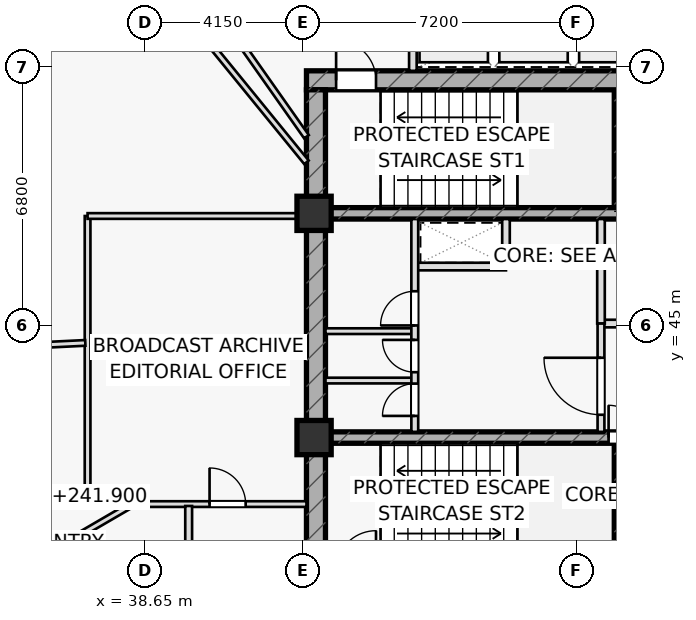
"""IFC4 building model, lengths in metres.
Left out: names, types, materials, properties, quantities, classifications, styles, units other than length and angle.
Written with IfcOpenShell. Run it as: python <this file> out.ifc"""

import sys

from ifc_helpers import new_model, si_unit, direction, frame, frame_2d, origin, origin_2d, place, context, subcontext, project, spatial, rectangle, extrude, element, fill, save


model = new_model("IFC4")
c1 = context("Model", 3, precision=1e-05, world=origin(), true_north=direction((0.0, 1.0)))
c2 = subcontext(c1, "Body", "Model", "MODEL_VIEW")
j1 = project(units=[si_unit("LENGTHUNIT", "METRE"), si_unit("PLANEANGLEUNIT", "RADIAN")], contexts=[c1])
p1 = place(None, origin())
s1 = spatial("IfcSite", under=j1, at=p1, CompositionType="ELEMENT")
p2 = place(p1, origin())
s2 = spatial("IfcBuilding", under=s1, at=p2, CompositionType="ELEMENT")
p3 = place(p2, frame((0.0, 0.0, 241.9)))
s3 = spatial("IfcBuildingStorey", under=s2, at=p3, CompositionType="ELEMENT", Elevation=241.9)
for number, where, z_axis, x_axis in (
    (1, (51.11, 48.1, 0.0), (0.0, 0.0, 1.0), (0.0, 1.0, 0.0)),
    (2, (51.11, 38.8, 0.0), (0.0, 0.0, 1.0), (0.0, 1.0, 0.0)),
):
    element("IfcWall", number, at=place(p3, frame(where, z_axis=z_axis, x_axis=x_axis)), inside=s3, PredefinedType="SHEAR", context=c2, shape_type="SweptSolid", body=[
        extrude(rectangle(XDim=3.1, YDim=0.22, at=frame_2d((1.55, 0.0))), origin(), (0.0, 0.0, 1.0), 3.65),
    ])
p4 = place(p3, frame((42.9, 51.45, 0.0), z_axis=(0.0, 0.0, 1.0), x_axis=(1.0, 0.0, 0.0)))
e3 = element("IfcWall", 3, at=p4, inside=s3, PredefinedType="SHEAR", context=c2, shape_type="SweptSolid", body=[
    extrude(rectangle(XDim=14.2, YDim=0.5, at=frame_2d((7.1, 0.0))), origin(), (0.0, 0.0, 1.0), 3.65),
])
p5 = place(p4, frame((0.78, 0.0, 0.0)))
e4 = element("IfcOpeningElement", 4, at=p5, cuts=e3, PredefinedType="OPENING", context=c2, shape_type="SweptSolid", body=[
    extrude(rectangle(XDim=1.05, YDim=2.2, at=frame_2d((0.525, 1.1))), frame((0.0, 0.26, 0.0), z_axis=(0.0, -1.0, 0.0), x_axis=(1.0, 0.0, 0.0)), (0.0, 0.0, 1.0), 0.52),
])
p6 = place(p3, frame((43.15, 38.8, 0.0), z_axis=(0.0, 0.0, 1.0), x_axis=(0.0, 1.0, 0.0)))
e5 = element("IfcWall", 5, at=p6, inside=s3, PredefinedType="SHEAR", context=c2, shape_type="SweptSolid", body=[
    extrude(rectangle(XDim=12.4, YDim=0.5, at=frame_2d((6.2, 0.0))), origin(), (0.0, 0.0, 1.0), 3.65),
])
p7 = place(p3, frame((43.4, 47.95, 0.0), z_axis=(0.0, 0.0, 1.0), x_axis=(1.0, 0.0, 0.0)))
e6 = element("IfcWall", 6, at=p7, inside=s3, PredefinedType="SHEAR", context=c2, shape_type="SweptSolid", body=[
    extrude(rectangle(XDim=13.2, YDim=0.3, at=frame_2d((6.6, 0.0))), origin(), (0.0, 0.0, 1.0), 3.65),
])
p8 = place(p7, frame((8.345, 0.0, 0.0)))
e7 = element("IfcOpeningElement", 7, at=p8, cuts=e6, PredefinedType="OPENING", context=c2, shape_type="SweptSolid", body=[
    extrude(rectangle(XDim=1.15, YDim=2.2, at=frame_2d((0.575, 1.1))), frame((0.0, 0.16, 0.0), z_axis=(0.0, -1.0, 0.0), x_axis=(1.0, 0.0, 0.0)), (0.0, 0.0, 1.0), 0.32),
])
p9 = place(p7, frame((10.065, 0.0, 0.0)))
e8 = element("IfcOpeningElement", 8, at=p9, cuts=e6, PredefinedType="OPENING", context=c2, shape_type="SweptSolid", body=[
    extrude(rectangle(XDim=1.15, YDim=2.2, at=frame_2d((0.575, 1.1))), frame((0.0, 0.16, 0.0), z_axis=(0.0, -1.0, 0.0), x_axis=(1.0, 0.0, 0.0)), (0.0, 0.0, 1.0), 0.32),
])
p10 = place(p7, frame((11.645, 0.0, 0.0)))
e9 = element("IfcOpeningElement", 9, at=p10, cuts=e6, PredefinedType="OPENING", context=c2, shape_type="SweptSolid", body=[
    extrude(rectangle(XDim=1.15, YDim=2.2, at=frame_2d((0.575, 1.1))), frame((0.0, 0.16, 0.0), z_axis=(0.0, -1.0, 0.0), x_axis=(1.0, 0.0, 0.0)), (0.0, 0.0, 1.0), 0.32),
])
p11 = place(p3, frame((43.4, 42.05, 0.0), z_axis=(0.0, 0.0, 1.0), x_axis=(1.0, 0.0, 0.0)))
e10 = element("IfcWall", 10, at=p11, inside=s3, PredefinedType="SHEAR", context=c2, shape_type="SweptSolid", body=[
    extrude(rectangle(XDim=13.2, YDim=0.3, at=frame_2d((6.6, 0.0))), origin(), (0.0, 0.0, 1.0), 3.65),
])
p12 = place(p11, frame((7.45, 0.0, 0.0)))
e11 = element("IfcOpeningElement", 11, at=p12, cuts=e10, PredefinedType="OPENING", context=c2, shape_type="SweptSolid", body=[
    extrude(rectangle(XDim=0.85, YDim=2.05, at=frame_2d((0.425, 1.025))), frame((0.0, 0.16, 0.0), z_axis=(0.0, -1.0, 0.0), x_axis=(1.0, 0.0, 0.0)), (0.0, 0.0, 1.0), 0.32),
])
p13 = place(p11, frame((9.5, 0.0, 0.0)))
e12 = element("IfcOpeningElement", 12, at=p13, cuts=e10, PredefinedType="OPENING", context=c2, shape_type="SweptSolid", body=[
    extrude(rectangle(XDim=0.85, YDim=2.05, at=frame_2d((0.425, 1.025))), frame((0.0, 0.16, 0.0), z_axis=(0.0, -1.0, 0.0), x_axis=(1.0, 0.0, 0.0)), (0.0, 0.0, 1.0), 0.32),
])
p14 = place(p11, frame((11.6, 0.0, 0.0)))
e13 = element("IfcOpeningElement", 13, at=p14, cuts=e10, PredefinedType="OPENING", context=c2, shape_type="SweptSolid", body=[
    extrude(rectangle(XDim=0.85, YDim=2.05, at=frame_2d((0.425, 1.025))), frame((0.0, 0.16, 0.0), z_axis=(0.0, -1.0, 0.0), x_axis=(1.0, 0.0, 0.0)), (0.0, 0.0, 1.0), 0.32),
])
for number, where, z_axis, x_axis in (
    (14, (43.1, 47.95, 0.0), (0.0, 0.0, 1.0), (1.0, 0.0, 0.0)),
    (15, (43.1, 42.05, 0.0), (0.0, 0.0, 1.0), (1.0, 0.0, 0.0)),
):
    element("IfcColumn", number, at=place(p3, frame(where, z_axis=z_axis, x_axis=x_axis)), inside=s3, PredefinedType="COLUMN", context=c2, shape_type="SweptSolid", body=[
        extrude(rectangle(XDim=0.9, YDim=0.9, at=origin_2d()), origin(), (0.0, 0.0, 1.0), 3.65),
    ])
p15 = place(p3, frame((45.7, 51.7, 0.0), z_axis=(0.0, 0.0, 1.0), x_axis=(0.0, 1.0, 0.0)))
e16 = element("IfcWall", 16, at=p15, inside=s3, PredefinedType="PARTITIONING", context=c2, shape_type="SweptSolid", body=[
    extrude(rectangle(XDim=2.6, YDim=0.2, at=frame_2d((1.3, 0.0))), origin(), (0.0, 0.0, 1.0), 3.65),
])
p16 = place(p3, frame((45.75, 46.55, 0.0), z_axis=(0.0, 0.0, 1.0), x_axis=(1.0, 0.0, 0.0)))
e17 = element("IfcWall", 17, at=p16, inside=s3, PredefinedType="PARTITIONING", context=c2, shape_type="SweptSolid", body=[
    extrude(rectangle(XDim=2.4, YDim=0.2, at=frame_2d((1.2, 0.0))), origin(), (0.0, 0.0, 1.0), 3.65),
])
p17 = place(p3, frame((48.15, 46.55, 0.0), z_axis=(0.0, 0.0, 1.0), x_axis=(0.0, 1.0, 0.0)))
e18 = element("IfcWall", 18, at=p17, inside=s3, PredefinedType="PARTITIONING", context=c2, shape_type="SweptSolid", body=[
    extrude(rectangle(XDim=1.25, YDim=0.2, at=frame_2d((0.625, 0.0))), origin(), (0.0, 0.0, 1.0), 3.65),
])
p18 = place(p3, frame((50.65, 45.05, 0.0), z_axis=(0.0, 0.0, 1.0), x_axis=(1.0, 0.0, 0.0)))
e19 = element("IfcWall", 19, at=p18, inside=s3, PredefinedType="PARTITIONING", context=c2, shape_type="SweptSolid", body=[
    extrude(rectangle(XDim=5.95, YDim=0.2, at=frame_2d((2.975, 0.0))), origin(), (0.0, 0.0, 1.0), 3.65),
])
p19 = place(p18, frame((1.35, 0.0, 0.0)))
e20 = element("IfcOpeningElement", 20, at=p19, cuts=e19, PredefinedType="OPENING", context=c2, shape_type="SweptSolid", body=[
    extrude(rectangle(XDim=1.5, YDim=2.2, at=frame_2d((0.75, 1.1))), frame((0.0, 0.11, 0.0), z_axis=(0.0, -1.0, 0.0), x_axis=(1.0, 0.0, 0.0)), (0.0, 0.0, 1.0), 0.22),
])
p20 = place(p3, frame((50.65, 45.05, 0.0), z_axis=(0.0, 0.0, 1.0), x_axis=(0.0, 1.0, 0.0)))
e21 = element("IfcWall", 21, at=p20, inside=s3, PredefinedType="PARTITIONING", context=c2, shape_type="SweptSolid", body=[
    extrude(rectangle(XDim=2.75, YDim=0.2, at=frame_2d((1.375, 0.0))), origin(), (0.0, 0.0, 1.0), 3.65),
])
p21 = place(p3, frame((50.65, 42.2, 0.0), z_axis=(0.0, 0.0, 1.0), x_axis=(0.0, 1.0, 0.0)))
e22 = element("IfcWall", 22, at=p21, inside=s3, PredefinedType="PARTITIONING", context=c2, shape_type="SweptSolid", body=[
    extrude(rectangle(XDim=2.85, YDim=0.18, at=frame_2d((1.425, 0.0))), origin(), (0.0, 0.0, 1.0), 3.65),
])
p22 = place(p21, frame((0.45, 0.0, 0.0)))
e23 = element("IfcOpeningElement", 23, at=p22, cuts=e22, PredefinedType="OPENING", context=c2, shape_type="SweptSolid", body=[
    extrude(rectangle(XDim=1.5, YDim=2.2, at=frame_2d((0.75, 1.1))), frame((0.0, 0.1, 0.0), z_axis=(0.0, -1.0, 0.0), x_axis=(1.0, 0.0, 0.0)), (0.0, 0.0, 1.0), 0.2),
])
for number, where, z_axis, x_axis in (
    (24, (43.4, 43.55, 0.0), (0.0, 0.0, 1.0), (1.0, 0.0, 0.0)),
    (25, (43.4, 44.85, 0.0), (0.0, 0.0, 1.0), (1.0, 0.0, 0.0)),
):
    element("IfcWall", number, at=place(p3, frame(where, z_axis=z_axis, x_axis=x_axis)), inside=s3, PredefinedType="PARTITIONING", context=c2, shape_type="SweptSolid", body=[
        extrude(rectangle(XDim=2.35, YDim=0.15, at=frame_2d((1.175, 0.0))), origin(), (0.0, 0.0, 1.0), 3.65),
    ])
p23 = place(p3, frame((45.75, 42.2, 0.0), z_axis=(0.0, 0.0, 1.0), x_axis=(0.0, 1.0, 0.0)))
e26 = element("IfcWall", 26, at=p23, inside=s3, PredefinedType="PARTITIONING", context=c2, shape_type="SweptSolid", body=[
    extrude(rectangle(XDim=5.6, YDim=0.18, at=frame_2d((2.8, 0.0))), origin(), (0.0, 0.0, 1.0), 3.65),
])
p24 = place(p23, frame((0.42, 0.0, 0.0)))
e27 = element("IfcOpeningElement", 27, at=p24, cuts=e26, PredefinedType="OPENING", context=c2, shape_type="SweptSolid", body=[
    extrude(rectangle(XDim=0.85, YDim=2.05, at=frame_2d((0.425, 1.025))), frame((0.0, 0.1, 0.0), z_axis=(0.0, -1.0, 0.0), x_axis=(1.0, 0.0, 0.0)), (0.0, 0.0, 1.0), 0.2),
])
p25 = place(p23, frame((1.57, 0.0, 0.0)))
e28 = element("IfcOpeningElement", 28, at=p25, cuts=e26, PredefinedType="OPENING", context=c2, shape_type="SweptSolid", body=[
    extrude(rectangle(XDim=0.85, YDim=2.05, at=frame_2d((0.425, 1.025))), frame((0.0, 0.1, 0.0), z_axis=(0.0, -1.0, 0.0), x_axis=(1.0, 0.0, 0.0)), (0.0, 0.0, 1.0), 0.2),
])
p26 = place(p23, frame((2.8, 0.0, 0.0)))
e29 = element("IfcOpeningElement", 29, at=p26, cuts=e26, PredefinedType="OPENING", context=c2, shape_type="SweptSolid", body=[
    extrude(rectangle(XDim=0.9, YDim=2.05, at=frame_2d((0.45, 1.025))), frame((0.0, 0.1, 0.0), z_axis=(0.0, -1.0, 0.0), x_axis=(1.0, 0.0, 0.0)), (0.0, 0.0, 1.0), 0.2),
])
p27 = place(p3, frame((37.14, 40.3, 0.0), z_axis=(0.0, 0.0, 1.0), x_axis=(1.0, 0.0, 0.0)))
e30 = element("IfcWall", 30, at=p27, inside=s3, PredefinedType="PARTITIONING", context=c2, shape_type="SweptSolid", body=[
    extrude(rectangle(XDim=5.76, YDim=0.15, at=frame_2d((2.88, 0.0))), origin(), (0.0, 0.0, 1.0), 3.025),
])
p28 = place(p27, frame((3.21, 0.0, 0.0)))
e31 = element("IfcOpeningElement", 31, at=p28, cuts=e30, PredefinedType="OPENING", context=c2, shape_type="SweptSolid", body=[
    extrude(rectangle(XDim=0.95, YDim=2.05, at=frame_2d((0.475, 1.025))), frame((0.0, 0.085, 0.0), z_axis=(0.0, -1.0, 0.0), x_axis=(1.0, 0.0, 0.0)), (0.0, 0.0, 1.0), 0.17),
])
p29 = place(p3, frame((37.14, 40.3, 0.0), z_axis=(0.0, 0.0, 1.0), x_axis=(0.0, 1.0, 0.0)))
e32 = element("IfcWall", 32, at=p29, inside=s3, PredefinedType="PARTITIONING", context=c2, shape_type="SweptSolid", body=[
    extrude(rectangle(XDim=7.58, YDim=0.15, at=frame_2d((3.79, 0.0))), origin(), (0.0, 0.0, 1.0), 3.65),
])
p30 = place(p3, frame((37.14, 47.88, 0.0), z_axis=(0.0, 0.0, 1.0), x_axis=(1.0, 0.0, 0.0)))
e33 = element("IfcWall", 33, at=p30, inside=s3, PredefinedType="PARTITIONING", context=c2, shape_type="SweptSolid", body=[
    extrude(rectangle(XDim=5.76, YDim=0.15, at=frame_2d((2.88, 0.0))), origin(), (0.0, 0.0, 1.0), 3.025),
])
p31 = place(p3, frame((42.9, 49.966, 0.0), z_axis=(0.0, 0.0, 1.0), x_axis=(-0.576088019717, 0.817387664171, 0.0)))
e34 = element("IfcWall", 34, at=p31, inside=s3, PredefinedType="PARTITIONING", context=c2, shape_type="SweptSolid", body=[
    extrude(rectangle(XDim=18.251, YDim=0.15, at=frame_2d((9.126, 0.0))), origin(), (0.0, 0.0, 1.0), 3.025),
])
p32 = place(p31, frame((8.213, 0.0, 0.0)))
e35 = element("IfcOpeningElement", 35, at=p32, cuts=e34, PredefinedType="OPENING", context=c2, shape_type="SweptSolid", body=[
    extrude(rectangle(XDim=0.95, YDim=2.05, at=frame_2d((0.475, 1.025))), frame((0.0, 0.085, 0.0), z_axis=(0.0, -1.0, 0.0), x_axis=(1.0, 0.0, 0.0)), (0.0, 0.0, 1.0), 0.17),
])
p33 = place(p3, frame((42.9, 49.292, 0.0), z_axis=(0.0, 0.0, 1.0), x_axis=(-0.63196588554, 0.774996206128, 0.0)))
e36 = element("IfcWall", 36, at=p33, inside=s3, PredefinedType="PARTITIONING", context=c2, shape_type="SweptSolid", body=[
    extrude(rectangle(XDim=19.884, YDim=0.15, at=frame_2d((9.942, 0.0))), origin(), (0.0, 0.0, 1.0), 3.025),
])
p34 = place(p33, frame((8.948, 0.0, 0.0)))
e37 = element("IfcOpeningElement", 37, at=p34, cuts=e36, PredefinedType="OPENING", context=c2, shape_type="SweptSolid", body=[
    extrude(rectangle(XDim=0.95, YDim=2.05, at=frame_2d((0.475, 1.025))), frame((0.0, 0.085, 0.0), z_axis=(0.0, -1.0, 0.0), x_axis=(1.0, 0.0, 0.0)), (0.0, 0.0, 1.0), 0.17),
])
p35 = place(p3, frame((37.08, 44.541, 0.0), z_axis=(0.0, 0.0, 1.0), x_axis=(-0.998789744321, -0.049183804653, 0.0)))
e38 = element("IfcWall", 38, at=p35, inside=s3, PredefinedType="PARTITIONING", context=c2, shape_type="SweptSolid", body=[
    extrude(rectangle(XDim=10.419, YDim=0.15, at=frame_2d((5.209, 0.0))), origin(), (0.0, 0.0, 1.0), 3.135),
])
p36 = place(p35, frame((3.15, 0.0, 0.0)))
e39 = element("IfcOpeningElement", 39, at=p36, cuts=e38, PredefinedType="OPENING", context=c2, shape_type="SweptSolid", body=[
    extrude(rectangle(XDim=0.95, YDim=2.05, at=frame_2d((0.475, 1.025))), frame((0.0, 0.085, 0.0), z_axis=(0.0, -1.0, 0.0), x_axis=(1.0, 0.0, 0.0)), (0.0, 0.0, 1.0), 0.17),
])
p37 = place(p3, frame((38.227, 40.24, 0.0), z_axis=(0.0, 0.0, 1.0), x_axis=(-0.864129548562, -0.503269434103, 0.0)))
e40 = element("IfcWall", 40, at=p37, inside=s3, PredefinedType="PARTITIONING", context=c2, shape_type="SweptSolid", body=[
    extrude(rectangle(XDim=10.146, YDim=0.15, at=frame_2d((5.073, 0.0))), origin(), (0.0, 0.0, 1.0), 3.135),
])
p38 = place(p3, frame((39.8, 36.17, 0.0), z_axis=(0.0, 0.0, 1.0), x_axis=(0.0, 1.0, 0.0)))
e41 = element("IfcWall", 41, at=p38, inside=s3, PredefinedType="PARTITIONING", context=c2, shape_type="SweptSolid", body=[
    extrude(rectangle(XDim=4.08, YDim=0.18, at=frame_2d((2.04, 0.0))), origin(), (0.0, 0.0, 1.0), 3.325),
])
p39 = place(p38, frame((1.868, 0.0, 0.0)))
e42 = element("IfcOpeningElement", 42, at=p39, cuts=e41, PredefinedType="OPENING", context=c2, shape_type="SweptSolid", body=[
    extrude(rectangle(XDim=0.95, YDim=2.05, at=frame_2d((0.475, 1.025))), frame((0.0, 0.1, 0.0), z_axis=(0.0, -1.0, 0.0), x_axis=(1.0, 0.0, 0.0)), (0.0, 0.0, 1.0), 0.2),
])
p40 = place(p5, origin())
e43 = element("IfcDoor", 43, at=p40, inside=s3, OperationType="SINGLE_SWING_LEFT", PredefinedType="DOOR", context=c2, shape_type="SweptSolid", body=[
    extrude(rectangle(XDim=1.05, YDim=2.2, at=frame_2d((0.525, 1.1))), frame((0.0, 0.025, 0.0), z_axis=(0.0, -1.0, 0.0), x_axis=(1.0, 0.0, 0.0)), (0.0, 0.0, 1.0), 0.05),
])
fill(e4, e43)
p41 = place(p22, origin())
e44 = element("IfcDoor", 44, at=p41, inside=s3, OperationType="SINGLE_SWING_RIGHT", PredefinedType="DOOR", context=c2, shape_type="SweptSolid", body=[
    extrude(rectangle(XDim=1.5, YDim=2.2, at=frame_2d((0.75, 1.1))), frame((0.0, 0.025, 0.0), z_axis=(0.0, -1.0, 0.0), x_axis=(1.0, 0.0, 0.0)), (0.0, 0.0, 1.0), 0.05),
])
fill(e23, e44)
p42 = place(p12, origin())
e45 = element("IfcDoor", 45, at=p42, inside=s3, OperationType="SINGLE_SWING_LEFT", PredefinedType="DOOR", context=c2, shape_type="SweptSolid", body=[
    extrude(rectangle(XDim=0.85, YDim=2.05, at=frame_2d((0.425, 1.025))), frame((0.0, 0.025, 0.0), z_axis=(0.0, -1.0, 0.0), x_axis=(1.0, 0.0, 0.0)), (0.0, 0.0, 1.0), 0.05),
])
fill(e11, e45)
p43 = place(p24, origin())
e46 = element("IfcDoor", 46, at=p43, inside=s3, OperationType="SINGLE_SWING_LEFT", PredefinedType="DOOR", context=c2, shape_type="SweptSolid", body=[
    extrude(rectangle(XDim=0.85, YDim=2.05, at=frame_2d((0.425, 1.025))), frame((0.0, 0.025, 0.0), z_axis=(0.0, -1.0, 0.0), x_axis=(1.0, 0.0, 0.0)), (0.0, 0.0, 1.0), 0.05),
])
fill(e27, e46)
p44 = place(p25, origin())
e47 = element("IfcDoor", 47, at=p44, inside=s3, OperationType="SINGLE_SWING_RIGHT", PredefinedType="DOOR", context=c2, shape_type="SweptSolid", body=[
    extrude(rectangle(XDim=0.85, YDim=2.05, at=frame_2d((0.425, 1.025))), frame((0.0, 0.025, 0.0), z_axis=(0.0, -1.0, 0.0), x_axis=(1.0, 0.0, 0.0)), (0.0, 0.0, 1.0), 0.05),
])
fill(e28, e47)
p45 = place(p26, origin())
e48 = element("IfcDoor", 48, at=p45, inside=s3, OperationType="SINGLE_SWING_LEFT", PredefinedType="DOOR", context=c2, shape_type="SweptSolid", body=[
    extrude(rectangle(XDim=0.9, YDim=2.05, at=frame_2d((0.45, 1.025))), frame((0.0, 0.025, 0.0), z_axis=(0.0, -1.0, 0.0), x_axis=(1.0, 0.0, 0.0)), (0.0, 0.0, 1.0), 0.05),
])
fill(e29, e48)
p46 = place(p28, origin())
e49 = element("IfcDoor", 49, at=p46, inside=s3, OperationType="SINGLE_SWING_LEFT", PredefinedType="DOOR", context=c2, shape_type="SweptSolid", body=[
    extrude(rectangle(XDim=0.95, YDim=2.05, at=frame_2d((0.475, 1.025))), frame((0.0, 0.025, 0.0), z_axis=(0.0, -1.0, 0.0), x_axis=(1.0, 0.0, 0.0)), (0.0, 0.0, 1.0), 0.05),
])
fill(e31, e49)
save(model, sys.argv[1])
